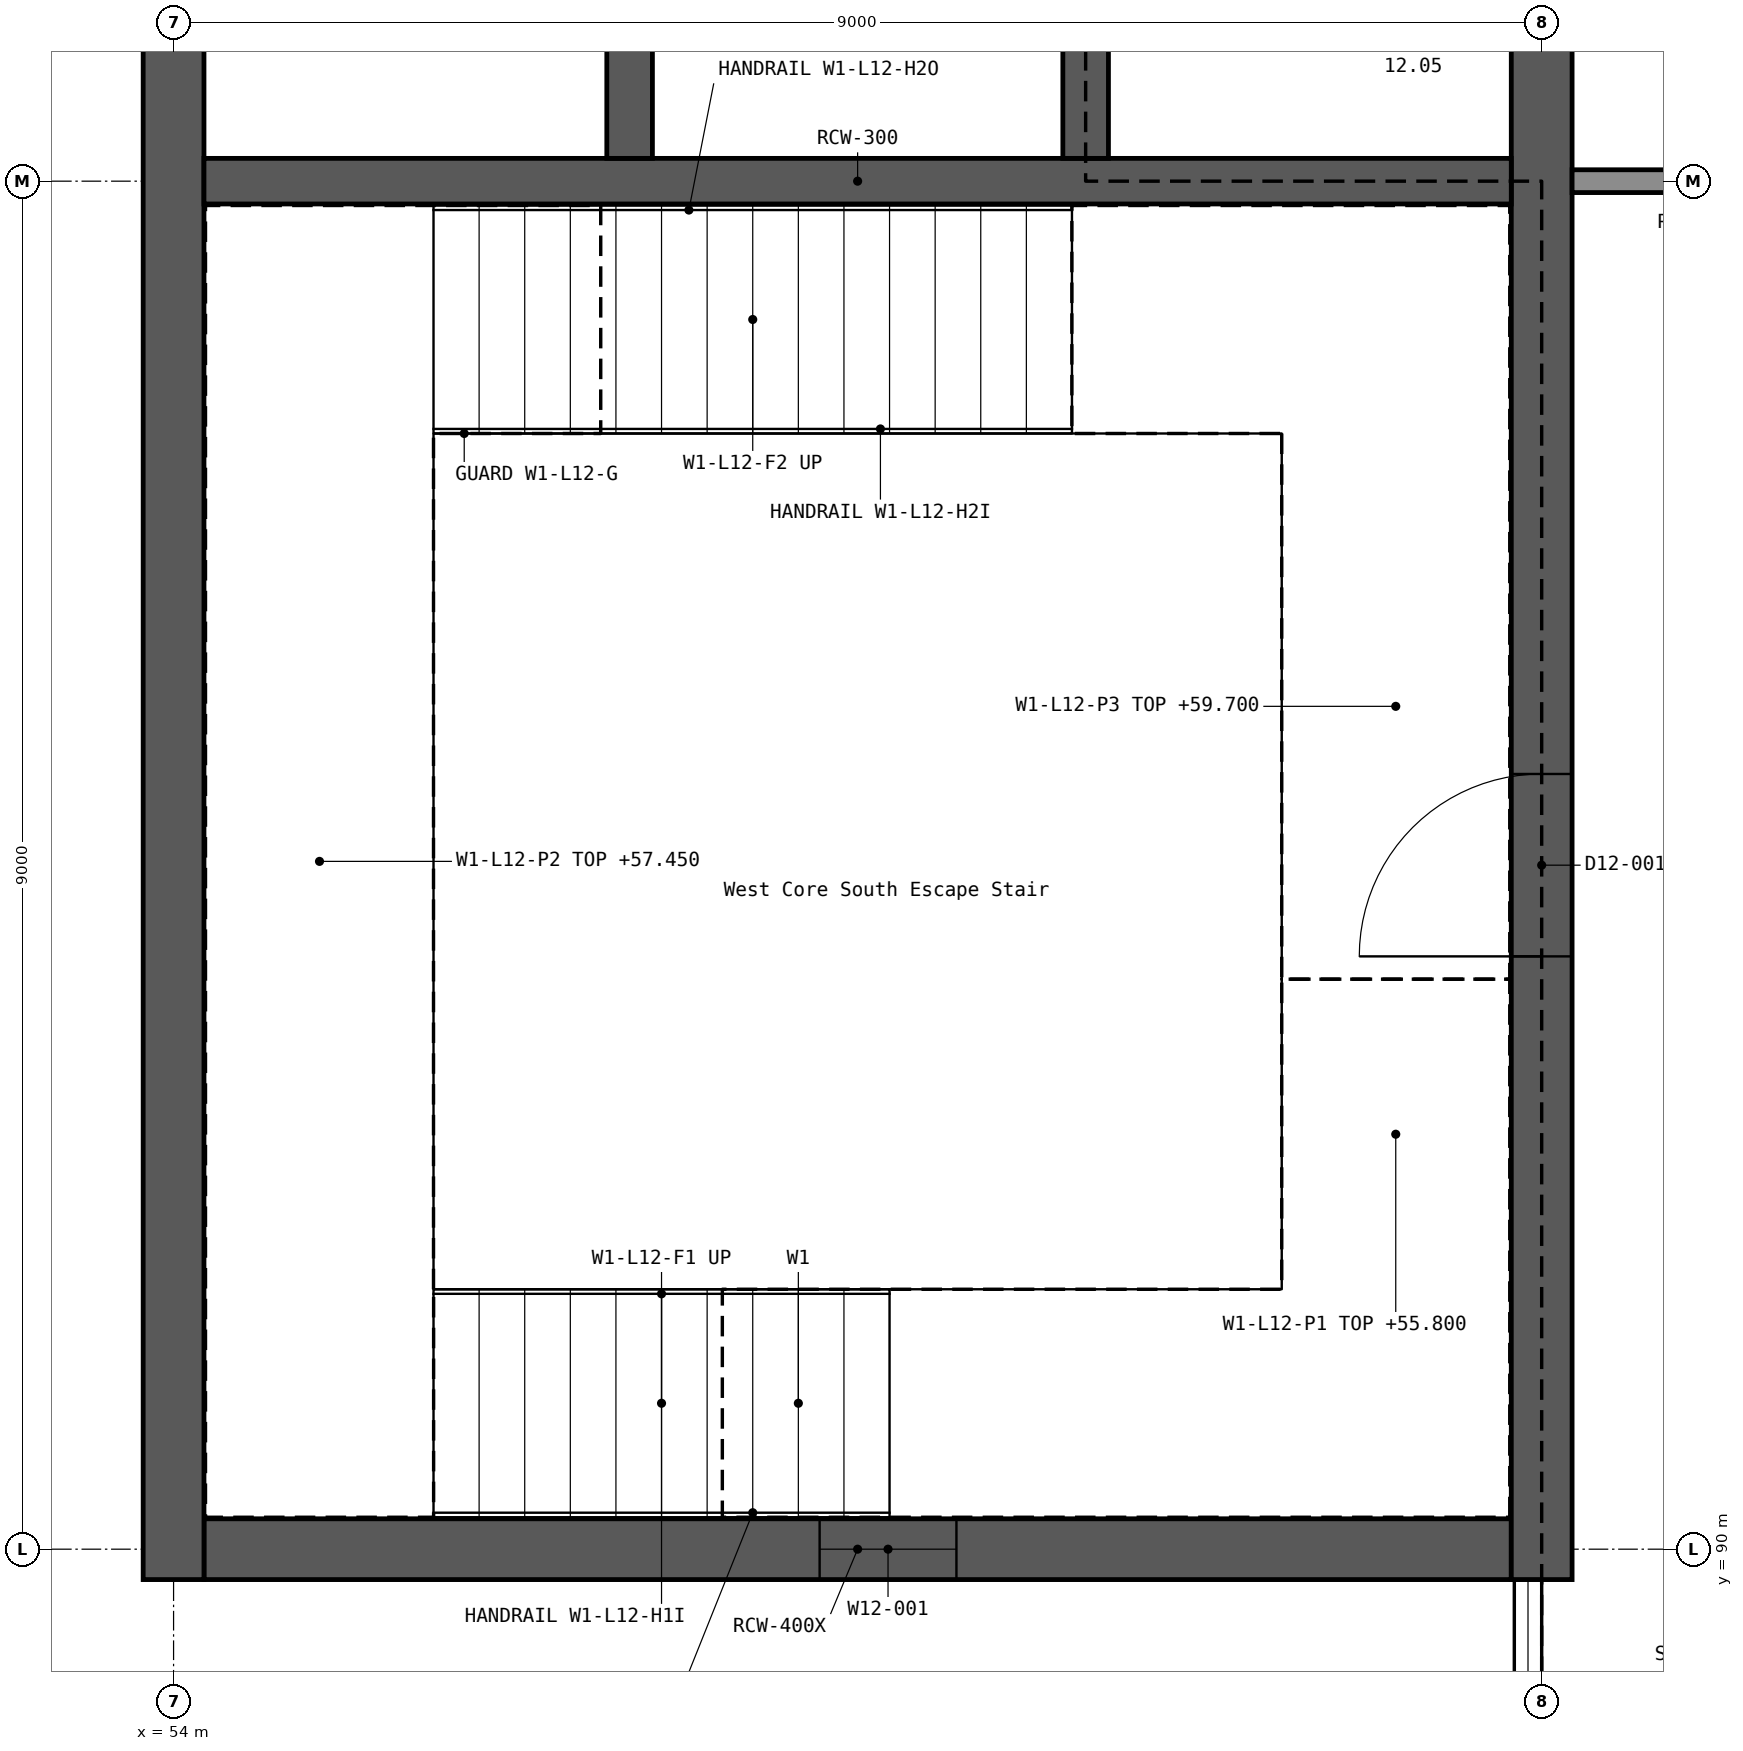
"""IFC4 building model, lengths in metres.
Left out: names, types, materials, properties, quantities, classifications, styles, units other than length and angle.
Written with IfcOpenShell. Run it as: python <this file> out.ifc"""

import sys

from ifc_helpers import new_model, si_unit, direction, frame, frame_2d, origin, place, context, subcontext, project, spatial, rectangle, extrude, element, fill, save


model = new_model("IFC4")
c1 = context("Model", 3, precision=1e-05, world=origin(), true_north=direction((0.0, 1.0)))
c2 = subcontext(c1, "Body", "Model", "MODEL_VIEW")
j1 = project(units=[si_unit("LENGTHUNIT", "METRE"), si_unit("PLANEANGLEUNIT", "RADIAN")], contexts=[c1])
p1 = place(None, origin())
s1 = spatial("IfcSite", under=j1, at=p1, CompositionType="ELEMENT")
p2 = place(p1, origin())
s2 = spatial("IfcBuilding", under=s1, at=p2, CompositionType="ELEMENT")
p3 = place(p2, frame((0.0, 0.0, 55.8)))
s3 = spatial("IfcBuildingStorey", under=s2, at=p3, CompositionType="ELEMENT", Elevation=55.8)
p4 = place(p3, frame((54.2, 90.0, 0.0), z_axis=(0.0, 0.0, 1.0), x_axis=(1.0, 0.0, 0.0)))
e1 = element("IfcWall", 1, at=p4, inside=s3, PredefinedType="SHEAR", context=c2, shape_type="SweptSolid", body=[
    extrude(rectangle(XDim=8.6, YDim=0.4, at=frame_2d((4.3, 0.0))), origin(), (0.0, 0.0, 1.0), 3.9),
])
p5 = place(p4, frame((4.05, 0.0, 1.2)))
e2 = element("IfcOpeningElement", 2, at=p5, cuts=e1, PredefinedType="OPENING", context=c2, shape_type="SweptSolid", body=[
    extrude(rectangle(XDim=0.9, YDim=1.5, at=frame_2d((0.45, 0.75))), frame((0.0, 0.211, 0.0), z_axis=(0.0, -1.0, 0.0), x_axis=(1.0, 0.0, 0.0)), (0.0, 0.0, 1.0), 0.422),
])
p6 = place(p3, frame((54.0, 89.8, 0.0), z_axis=(0.0, 0.0, 1.0), x_axis=(0.0, 1.0, 0.0)))
e3 = element("IfcWall", 3, at=p6, inside=s3, PredefinedType="SHEAR", context=c2, shape_type="SweptSolid", body=[
    extrude(rectangle(XDim=27.4, YDim=0.4, at=frame_2d((13.7, 0.0))), origin(), (0.0, 0.0, 1.0), 3.9),
])
p7 = place(p3, frame((63.0, 89.8, 0.0), z_axis=(0.0, 0.0, 1.0), x_axis=(0.0, 1.0, 0.0)))
e4 = element("IfcWall", 4, at=p7, inside=s3, PredefinedType="SHEAR", context=c2, shape_type="SweptSolid", body=[
    extrude(rectangle(XDim=27.4, YDim=0.4, at=frame_2d((13.7, 0.0))), origin(), (0.0, 0.0, 1.0), 3.9),
])
p8 = place(p7, frame((4.1, 0.0, 0.0)))
e5 = element("IfcOpeningElement", 5, at=p8, cuts=e4, PredefinedType="OPENING", context=c2, shape_type="SweptSolid", body=[
    extrude(rectangle(XDim=1.2, YDim=2.1, at=frame_2d((0.6, 1.05))), frame((0.0, 0.211, 0.0), z_axis=(0.0, -1.0, 0.0), x_axis=(1.0, 0.0, 0.0)), (0.0, 0.0, 1.0), 0.422),
])
p9 = place(p7, frame((22.1, 0.0, 0.0)))
e6 = element("IfcOpeningElement", 6, at=p9, cuts=e4, PredefinedType="OPENING", context=c2, shape_type="SweptSolid", body=[
    extrude(rectangle(XDim=1.2, YDim=2.1, at=frame_2d((0.6, 1.05))), frame((0.0, 0.211, 0.0), z_axis=(0.0, -1.0, 0.0), x_axis=(1.0, 0.0, 0.0)), (0.0, 0.0, 1.0), 0.422),
])
p10 = place(p7, frame((12.5, 0.0, 0.0)))
e7 = element("IfcOpeningElement", 7, at=p10, cuts=e4, PredefinedType="OPENING", context=c2, shape_type="SweptSolid", body=[
    extrude(rectangle(XDim=2.0, YDim=2.1, at=frame_2d((1.0, 1.05))), frame((0.0, 0.211, 0.0), z_axis=(0.0, -1.0, 0.0), x_axis=(1.0, 0.0, 0.0)), (0.0, 0.0, 1.0), 0.422),
])
p11 = place(p3, frame((54.2, 99.0, 0.0), z_axis=(0.0, 0.0, 1.0), x_axis=(1.0, 0.0, 0.0)))
e8 = element("IfcWall", 8, at=p11, inside=s3, PredefinedType="SHEAR", context=c2, shape_type="SweptSolid", body=[
    extrude(rectangle(XDim=8.6, YDim=0.3, at=frame_2d((4.3, 0.0))), origin(), (0.0, 0.0, 1.0), 3.9),
])
p12 = place(p3, frame((57.0, 99.15, 0.0), z_axis=(0.0, 0.0, 1.0), x_axis=(0.0, 1.0, 0.0)))
e9 = element("IfcWall", 9, at=p12, inside=s3, PredefinedType="SHEAR", context=c2, shape_type="SweptSolid", body=[
    extrude(rectangle(XDim=8.7, YDim=0.3, at=frame_2d((4.35, 0.0))), origin(), (0.0, 0.0, 1.0), 3.9),
])
p13 = place(p3, frame((60.0, 99.15, 0.0), z_axis=(0.0, 0.0, 1.0), x_axis=(0.0, 1.0, 0.0)))
e10 = element("IfcWall", 10, at=p13, inside=s3, PredefinedType="SHEAR", context=c2, shape_type="SweptSolid", body=[
    extrude(rectangle(XDim=8.7, YDim=0.3, at=frame_2d((4.35, 0.0))), origin(), (0.0, 0.0, 1.0), 3.9),
])
p14 = place(p13, frame((0.8, 0.0, 0.0)))
e11 = element("IfcOpeningElement", 11, at=p14, cuts=e10, PredefinedType="OPENING", context=c2, shape_type="SweptSolid", body=[
    extrude(rectangle(XDim=1.1, YDim=2.1, at=frame_2d((0.55, 1.05))), frame((0.0, 0.161, 0.0), z_axis=(0.0, -1.0, 0.0), x_axis=(1.0, 0.0, 0.0)), (0.0, 0.0, 1.0), 0.322),
])
p15 = place(p13, frame((3.8, 0.0, 0.0)))
e12 = element("IfcOpeningElement", 12, at=p15, cuts=e10, PredefinedType="OPENING", context=c2, shape_type="SweptSolid", body=[
    extrude(rectangle(XDim=1.1, YDim=2.1, at=frame_2d((0.55, 1.05))), frame((0.0, 0.161, 0.0), z_axis=(0.0, -1.0, 0.0), x_axis=(1.0, 0.0, 0.0)), (0.0, 0.0, 1.0), 0.322),
])
p16 = place(p13, frame((6.8, 0.0, 0.0)))
e13 = element("IfcOpeningElement", 13, at=p16, cuts=e10, PredefinedType="OPENING", context=c2, shape_type="SweptSolid", body=[
    extrude(rectangle(XDim=1.1, YDim=2.1, at=frame_2d((0.55, 1.05))), frame((0.0, 0.161, 0.0), z_axis=(0.0, -1.0, 0.0), x_axis=(1.0, 0.0, 0.0)), (0.0, 0.0, 1.0), 0.322),
])
p17 = place(p3, frame((63.2, 99.0, 0.0), z_axis=(0.0, 0.0, 1.0), x_axis=(1.0, 0.0, 0.0)))
e14 = element("IfcWall", 14, at=p17, inside=s3, PredefinedType="PARTITIONING", context=c2, shape_type="SweptSolid", body=[
    extrude(rectangle(XDim=2.8, YDim=0.15, at=frame_2d((1.4, 0.0))), origin(), (0.0, 0.0, 1.0), 3.27),
])
p18 = place(p17, frame((0.7, 0.0, 0.0)))
e15 = element("IfcOpeningElement", 15, at=p18, cuts=e14, PredefinedType="OPENING", context=c2, shape_type="SweptSolid", body=[
    extrude(rectangle(XDim=1.2, YDim=2.1, at=frame_2d((0.6, 1.05))), frame((0.0, 0.086, 0.0), z_axis=(0.0, -1.0, 0.0), x_axis=(1.0, 0.0, 0.0)), (0.0, 0.0, 1.0), 0.172),
])
p19 = place(p5, origin())
e16 = element("IfcWindow", 16, at=p19, inside=s3, PartitioningType="SINGLE_PANEL", PredefinedType="WINDOW", context=c2, shape_type="SweptSolid", body=[
    extrude(rectangle(XDim=0.9, YDim=1.5, at=frame_2d((0.45, 0.75))), frame((0.0, 0.03, 0.0), z_axis=(0.0, -1.0, 0.0), x_axis=(1.0, 0.0, 0.0)), (0.0, 0.0, 1.0), 0.06),
])
fill(e2, e16)
p20 = place(p8, origin())
e17 = element("IfcDoor", 17, at=p20, inside=s3, OperationType="SINGLE_SWING_LEFT", PredefinedType="DOOR", context=c2, shape_type="SweptSolid", body=[
    extrude(rectangle(XDim=1.2, YDim=2.1, at=frame_2d((0.6, 1.05))), frame((0.0, 0.025, 0.0), z_axis=(0.0, -1.0, 0.0), x_axis=(1.0, 0.0, 0.0)), (0.0, 0.0, 1.0), 0.05),
])
fill(e5, e17)
save(model, sys.argv[1])
